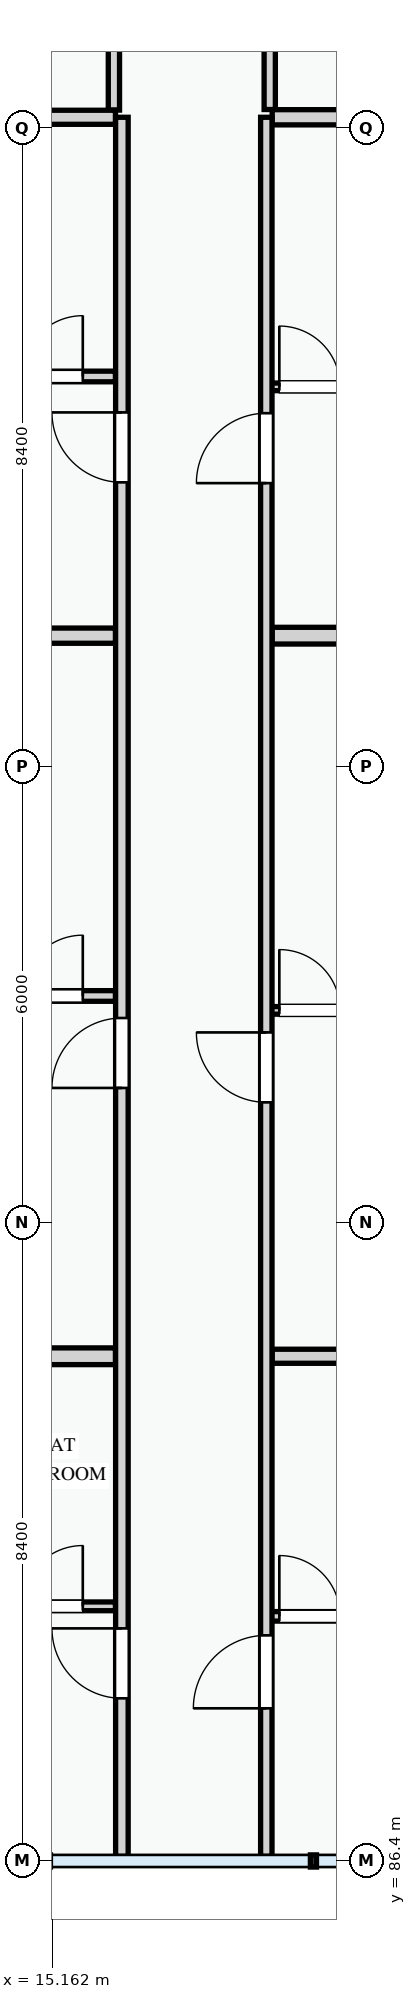
"""IFC4 building model, lengths in metres.
Left out: names, types, materials, properties, quantities, classifications, styles, units other than length and angle.
Written with IfcOpenShell. Run it as: python <this file> out.ifc"""

import sys

from ifc_helpers import new_model, si_unit, direction, frame, frame_2d, origin, place, context, subcontext, project, spatial, rectangle, extrude, element, fill, save


model = new_model("IFC4")
c1 = context("Model", 3, precision=1e-05, world=origin(), true_north=direction((0.0, 1.0)))
c2 = subcontext(c1, "Body", "Model", "MODEL_VIEW")
j1 = project(units=[si_unit("LENGTHUNIT", "METRE"), si_unit("PLANEANGLEUNIT", "RADIAN")], contexts=[c1])
p1 = place(None, origin())
s1 = spatial("IfcSite", under=j1, at=p1, CompositionType="ELEMENT")
p2 = place(p1, origin())
s2 = spatial("IfcBuilding", under=s1, at=p2, CompositionType="ELEMENT")
p3 = place(p2, frame((0.0, 0.0, 31.2)))
s3 = spatial("IfcBuildingStorey", under=s2, at=p3, CompositionType="ELEMENT", Elevation=31.2)
p4 = place(p3, frame((15.975, 113.324, 0.0), z_axis=(0.0, 0.0, 1.0), x_axis=(0.0, -1.0, 0.0)))
e1 = element("IfcWall", 1, at=p4, inside=s3, PredefinedType="PARTITIONING", context=c2, shape_type="SweptSolid", body=[
    extrude(rectangle(XDim=3.889, YDim=0.148, at=frame_2d((1.945, 0.0))), origin(), (0.0, 0.0, 1.0), 3.0),
])
p5 = place(p3, frame((18.025, 113.324, 0.0), z_axis=(0.0, 0.0, 1.0), x_axis=(0.0, -1.0, 0.0)))
e2 = element("IfcWall", 2, at=p5, inside=s3, PredefinedType="PARTITIONING", context=c2, shape_type="SweptSolid", body=[
    extrude(rectangle(XDim=3.882, YDim=0.148, at=frame_2d((1.941, 0.0))), origin(), (0.0, 0.0, 1.0), 3.0),
])
p6 = place(p3, frame((8.54, 89.75, 0.0), z_axis=(0.0, 0.0, 1.0), x_axis=(1.0, 0.0, 0.0)))
e3 = element("IfcWall", 3, at=p6, inside=s3, PredefinedType="PARTITIONING", context=c2, shape_type="SweptSolid", body=[
    extrude(rectangle(XDim=7.456, YDim=0.115, at=frame_2d((3.728, 0.0))), origin(), (0.0, 0.0, 1.0), 3.0),
])
p7 = place(p6, frame((1.324, 0.0, 0.0)))
e4 = element("IfcOpeningElement", 4, at=p7, cuts=e3, PredefinedType="OPENING", context=c2, shape_type="SweptSolid", body=[
    extrude(rectangle(XDim=0.85, YDim=2.1, at=frame_2d((0.425, 1.05))), frame((0.0, 0.067, 0.0), z_axis=(0.0, -1.0, 0.0), x_axis=(1.0, 0.0, 0.0)), (0.0, 0.0, 1.0), 0.135),
])
p8 = place(p6, frame((4.22, 0.0, 0.0)))
e5 = element("IfcOpeningElement", 5, at=p8, cuts=e3, PredefinedType="OPENING", context=c2, shape_type="SweptSolid", body=[
    extrude(rectangle(XDim=0.85, YDim=2.1, at=frame_2d((0.425, 1.05))), frame((0.0, 0.067, 0.0), z_axis=(0.0, -1.0, 0.0), x_axis=(1.0, 0.0, 0.0)), (0.0, 0.0, 1.0), 0.135),
])
p9 = place(p6, frame((6.226, 0.0, 0.0)))
e6 = element("IfcOpeningElement", 6, at=p9, cuts=e3, PredefinedType="OPENING", context=c2, shape_type="SweptSolid", body=[
    extrude(rectangle(XDim=0.8, YDim=2.1, at=frame_2d((0.4, 1.05))), frame((0.0, 0.067, 0.0), z_axis=(0.0, -1.0, 0.0), x_axis=(1.0, 0.0, 0.0)), (0.0, 0.0, 1.0), 0.135),
])
p10 = place(p3, frame((17.98, 89.618, 0.0), z_axis=(0.0, 0.0, 1.0), x_axis=(1.0, 0.0, 0.0)))
e7 = element("IfcWall", 7, at=p10, inside=s3, PredefinedType="PARTITIONING", context=c2, shape_type="SweptSolid", body=[
    extrude(rectangle(XDim=4.68, YDim=0.125, at=frame_2d((2.34, 0.0))), origin(), (0.0, 0.0, 1.0), 3.0),
])
p11 = place(p10, frame((0.171, 0.0, 0.0)))
e8 = element("IfcOpeningElement", 8, at=p11, cuts=e7, PredefinedType="OPENING", context=c2, shape_type="SweptSolid", body=[
    extrude(rectangle(XDim=0.8, YDim=2.1, at=frame_2d((0.4, 1.05))), frame((0.0, 0.073, 0.0), z_axis=(0.0, -1.0, 0.0), x_axis=(1.0, 0.0, 0.0)), (0.0, 0.0, 1.0), 0.145),
])
p12 = place(p10, frame((1.384, 0.0, 0.0)))
e9 = element("IfcOpeningElement", 9, at=p12, cuts=e7, PredefinedType="OPENING", context=c2, shape_type="SweptSolid", body=[
    extrude(rectangle(XDim=0.85, YDim=2.1, at=frame_2d((0.425, 1.05))), frame((0.0, 0.073, 0.0), z_axis=(0.0, -1.0, 0.0), x_axis=(1.0, 0.0, 0.0)), (0.0, 0.0, 1.0), 0.145),
])
p13 = place(p10, frame((3.193, 0.0, 0.0)))
e10 = element("IfcOpeningElement", 10, at=p13, cuts=e7, PredefinedType="OPENING", context=c2, shape_type="SweptSolid", body=[
    extrude(rectangle(XDim=0.85, YDim=2.1, at=frame_2d((0.425, 1.05))), frame((0.0, 0.073, 0.0), z_axis=(0.0, -1.0, 0.0), x_axis=(1.0, 0.0, 0.0)), (0.0, 0.0, 1.0), 0.145),
])
p14 = place(p3, frame((8.54, 97.78, 0.0), z_axis=(0.0, 0.0, 1.0), x_axis=(1.0, 0.0, 0.0)))
e11 = element("IfcWall", 11, at=p14, inside=s3, PredefinedType="PARTITIONING", context=c2, shape_type="SweptSolid", body=[
    extrude(rectangle(XDim=7.456, YDim=0.14, at=frame_2d((3.728, 0.0))), origin(), (0.0, 0.0, 1.0), 3.0),
])
p15 = place(p14, frame((1.324, 0.0, 0.0)))
e12 = element("IfcOpeningElement", 12, at=p15, cuts=e11, PredefinedType="OPENING", context=c2, shape_type="SweptSolid", body=[
    extrude(rectangle(XDim=0.85, YDim=2.1, at=frame_2d((0.425, 1.05))), frame((0.0, 0.08, 0.0), z_axis=(0.0, -1.0, 0.0), x_axis=(1.0, 0.0, 0.0)), (0.0, 0.0, 1.0), 0.16),
])
p16 = place(p14, frame((4.22, 0.0, 0.0)))
e13 = element("IfcOpeningElement", 13, at=p16, cuts=e11, PredefinedType="OPENING", context=c2, shape_type="SweptSolid", body=[
    extrude(rectangle(XDim=0.82, YDim=2.08, at=frame_2d((0.41, 1.04))), frame((0.0, 0.08, 0.0), z_axis=(0.0, -1.0, 0.0), x_axis=(1.0, 0.0, 0.0)), (0.0, 0.0, 1.0), 0.16),
])
p17 = place(p14, frame((6.226, 0.0, 0.0)))
e14 = element("IfcOpeningElement", 14, at=p17, cuts=e11, PredefinedType="OPENING", context=c2, shape_type="SweptSolid", body=[
    extrude(rectangle(XDim=0.8, YDim=2.1, at=frame_2d((0.4, 1.05))), frame((0.0, 0.08, 0.0), z_axis=(0.0, -1.0, 0.0), x_axis=(1.0, 0.0, 0.0)), (0.0, 0.0, 1.0), 0.16),
])
p18 = place(p3, frame((17.98, 97.59, 0.0), z_axis=(0.0, 0.0, 1.0), x_axis=(1.0, 0.0, 0.0)))
e15 = element("IfcWall", 15, at=p18, inside=s3, PredefinedType="PARTITIONING", context=c2, shape_type="SweptSolid", body=[
    extrude(rectangle(XDim=4.76, YDim=0.1, at=frame_2d((2.38, 0.0))), origin(), (0.0, 0.0, 1.0), 3.0),
])
p19 = place(p18, frame((0.171, 0.0, 0.0)))
e16 = element("IfcOpeningElement", 16, at=p19, cuts=e15, PredefinedType="OPENING", context=c2, shape_type="SweptSolid", body=[
    extrude(rectangle(XDim=0.8, YDim=2.1, at=frame_2d((0.4, 1.05))), frame((0.0, 0.06, 0.0), z_axis=(0.0, -1.0, 0.0), x_axis=(1.0, 0.0, 0.0)), (0.0, 0.0, 1.0), 0.12),
])
p20 = place(p18, frame((1.384, 0.0, 0.0)))
e17 = element("IfcOpeningElement", 17, at=p20, cuts=e15, PredefinedType="OPENING", context=c2, shape_type="SweptSolid", body=[
    extrude(rectangle(XDim=0.85, YDim=2.1, at=frame_2d((0.425, 1.05))), frame((0.0, 0.06, 0.0), z_axis=(0.0, -1.0, 0.0), x_axis=(1.0, 0.0, 0.0)), (0.0, 0.0, 1.0), 0.12),
])
p21 = place(p18, frame((3.193, 0.0, 0.0)))
e18 = element("IfcOpeningElement", 18, at=p21, cuts=e15, PredefinedType="OPENING", context=c2, shape_type="SweptSolid", body=[
    extrude(rectangle(XDim=0.82, YDim=2.08, at=frame_2d((0.41, 1.04))), frame((0.0, 0.06, 0.0), z_axis=(0.0, -1.0, 0.0), x_axis=(1.0, 0.0, 0.0)), (0.0, 0.0, 1.0), 0.12),
])
p22 = place(p3, frame((8.54, 93.04, 0.0), z_axis=(0.0, 0.0, 1.0), x_axis=(1.0, 0.0, 0.0)))
e19 = element("IfcWall", 19, at=p22, inside=s3, PredefinedType="PARTITIONING", context=c2, shape_type="SweptSolid", body=[
    extrude(rectangle(XDim=7.456, YDim=0.22, at=frame_2d((3.728, 0.0))), origin(), (0.0, 0.0, 1.0), 3.0),
])
p23 = place(p3, frame((18.057, 93.04, 0.0), z_axis=(0.0, 0.0, 1.0), x_axis=(1.0, 0.0, 0.0)))
e20 = element("IfcWall", 20, at=p23, inside=s3, PredefinedType="PARTITIONING", context=c2, shape_type="SweptSolid", body=[
    extrude(rectangle(XDim=4.604, YDim=0.185, at=frame_2d((2.302, 0.0))), origin(), (0.0, 0.0, 1.0), 3.0),
])
p24 = place(p3, frame((8.54, 105.93, 0.0), z_axis=(0.0, 0.0, 1.0), x_axis=(1.0, 0.0, 0.0)))
e21 = element("IfcWall", 21, at=p24, inside=s3, PredefinedType="PARTITIONING", context=c2, shape_type="SweptSolid", body=[
    extrude(rectangle(XDim=7.456, YDim=0.14, at=frame_2d((3.728, 0.0))), origin(), (0.0, 0.0, 1.0), 3.0),
])
p25 = place(p24, frame((1.324, 0.0, 0.0)))
e22 = element("IfcOpeningElement", 22, at=p25, cuts=e21, PredefinedType="OPENING", context=c2, shape_type="SweptSolid", body=[
    extrude(rectangle(XDim=0.85, YDim=2.1, at=frame_2d((0.425, 1.05))), frame((0.0, 0.08, 0.0), z_axis=(0.0, -1.0, 0.0), x_axis=(1.0, 0.0, 0.0)), (0.0, 0.0, 1.0), 0.16),
])
p26 = place(p24, frame((4.22, 0.0, 0.0)))
e23 = element("IfcOpeningElement", 23, at=p26, cuts=e21, PredefinedType="OPENING", context=c2, shape_type="SweptSolid", body=[
    extrude(rectangle(XDim=0.85, YDim=2.1, at=frame_2d((0.425, 1.05))), frame((0.0, 0.08, 0.0), z_axis=(0.0, -1.0, 0.0), x_axis=(1.0, 0.0, 0.0)), (0.0, 0.0, 1.0), 0.16),
])
p27 = place(p24, frame((6.226, 0.0, 0.0)))
e24 = element("IfcOpeningElement", 24, at=p27, cuts=e21, PredefinedType="OPENING", context=c2, shape_type="SweptSolid", body=[
    extrude(rectangle(XDim=0.8, YDim=2.1, at=frame_2d((0.4, 1.05))), frame((0.0, 0.08, 0.0), z_axis=(0.0, -1.0, 0.0), x_axis=(1.0, 0.0, 0.0)), (0.0, 0.0, 1.0), 0.16),
])
p28 = place(p3, frame((17.98, 105.794, 0.0), z_axis=(0.0, 0.0, 1.0), x_axis=(1.0, 0.0, 0.0)))
e25 = element("IfcWall", 25, at=p28, inside=s3, PredefinedType="PARTITIONING", context=c2, shape_type="SweptSolid", body=[
    extrude(rectangle(XDim=4.68, YDim=0.1, at=frame_2d((2.34, 0.0))), origin(), (0.0, 0.0, 1.0), 3.0),
])
p29 = place(p28, frame((0.171, 0.0, 0.0)))
e26 = element("IfcOpeningElement", 26, at=p29, cuts=e25, PredefinedType="OPENING", context=c2, shape_type="SweptSolid", body=[
    extrude(rectangle(XDim=0.8, YDim=2.1, at=frame_2d((0.4, 1.05))), frame((0.0, 0.06, 0.0), z_axis=(0.0, -1.0, 0.0), x_axis=(1.0, 0.0, 0.0)), (0.0, 0.0, 1.0), 0.12),
])
p30 = place(p28, frame((1.384, 0.0, 0.0)))
e27 = element("IfcOpeningElement", 27, at=p30, cuts=e25, PredefinedType="OPENING", context=c2, shape_type="SweptSolid", body=[
    extrude(rectangle(XDim=0.85, YDim=2.1, at=frame_2d((0.425, 1.05))), frame((0.0, 0.06, 0.0), z_axis=(0.0, -1.0, 0.0), x_axis=(1.0, 0.0, 0.0)), (0.0, 0.0, 1.0), 0.12),
])
p31 = place(p28, frame((3.193, 0.0, 0.0)))
e28 = element("IfcOpeningElement", 28, at=p31, cuts=e25, PredefinedType="OPENING", context=c2, shape_type="SweptSolid", body=[
    extrude(rectangle(XDim=0.85, YDim=2.1, at=frame_2d((0.425, 1.05))), frame((0.0, 0.06, 0.0), z_axis=(0.0, -1.0, 0.0), x_axis=(1.0, 0.0, 0.0)), (0.0, 0.0, 1.0), 0.12),
])
p32 = place(p3, frame((8.54, 102.52, 0.0), z_axis=(0.0, 0.0, 1.0), x_axis=(1.0, 0.0, 0.0)))
e29 = element("IfcWall", 29, at=p32, inside=s3, PredefinedType="PARTITIONING", context=c2, shape_type="SweptSolid", body=[
    extrude(rectangle(XDim=7.456, YDim=0.2, at=frame_2d((3.728, 0.0))), origin(), (0.0, 0.0, 1.0), 3.0),
])
p33 = place(p3, frame((18.057, 102.52, 0.0), z_axis=(0.0, 0.0, 1.0), x_axis=(1.0, 0.0, 0.0)))
e30 = element("IfcWall", 30, at=p33, inside=s3, PredefinedType="PARTITIONING", context=c2, shape_type="SweptSolid", body=[
    extrude(rectangle(XDim=4.604, YDim=0.22, at=frame_2d((2.302, 0.0))), origin(), (0.0, 0.0, 1.0), 3.0),
])
p34 = place(p3, frame((8.54, 109.34, 0.0), z_axis=(0.0, 0.0, 1.0), x_axis=(1.0, 0.0, 0.0)))
e31 = element("IfcWall", 31, at=p34, inside=s3, PredefinedType="PARTITIONING", context=c2, shape_type="SweptSolid", body=[
    extrude(rectangle(XDim=7.456, YDim=0.185, at=frame_2d((3.728, 0.0))), origin(), (0.0, 0.0, 1.0), 2.375),
])
p35 = place(p3, frame((18.057, 109.34, 0.0), z_axis=(0.0, 0.0, 1.0), x_axis=(1.0, 0.0, 0.0)))
e32 = element("IfcWall", 32, at=p35, inside=s3, PredefinedType="PARTITIONING", context=c2, shape_type="SweptSolid", body=[
    extrude(rectangle(XDim=4.683, YDim=0.2, at=frame_2d((2.342, 0.0))), origin(), (0.0, 0.0, 1.0), 2.375),
])
p36 = place(p3, frame((16.08, 86.46, 0.0), z_axis=(0.0, 0.0, 1.0), x_axis=(0.0, 1.0, 0.0)))
e33 = element("IfcWall", 33, at=p36, inside=s3, PredefinedType="PARTITIONING", context=c2, shape_type="SweptSolid", body=[
    extrude(rectangle(XDim=22.88, YDim=0.165, at=frame_2d((11.44, 0.0))), origin(), (0.0, 0.0, 1.0), 3.0),
])
p37 = place(p36, frame((2.08, 0.0, 0.0)))
e34 = element("IfcOpeningElement", 34, at=p37, cuts=e33, PredefinedType="OPENING", context=c2, shape_type="SweptSolid", body=[
    extrude(rectangle(XDim=0.92, YDim=2.1, at=frame_2d((0.46, 1.05))), frame((0.0, 0.093, 0.0), z_axis=(0.0, -1.0, 0.0), x_axis=(1.0, 0.0, 0.0)), (0.0, 0.0, 1.0), 0.185),
])
p38 = place(p36, frame((10.11, 0.0, 0.0)))
e35 = element("IfcOpeningElement", 35, at=p38, cuts=e33, PredefinedType="OPENING", context=c2, shape_type="SweptSolid", body=[
    extrude(rectangle(XDim=0.92, YDim=2.1, at=frame_2d((0.46, 1.05))), frame((0.0, 0.093, 0.0), z_axis=(0.0, -1.0, 0.0), x_axis=(1.0, 0.0, 0.0)), (0.0, 0.0, 1.0), 0.185),
])
p39 = place(p36, frame((18.077, 0.0, 0.0)))
e36 = element("IfcOpeningElement", 36, at=p39, cuts=e33, PredefinedType="OPENING", context=c2, shape_type="SweptSolid", body=[
    extrude(rectangle(XDim=0.92, YDim=2.1, at=frame_2d((0.46, 1.05))), frame((0.0, 0.093, 0.0), z_axis=(0.0, -1.0, 0.0), x_axis=(1.0, 0.0, 0.0)), (0.0, 0.0, 1.0), 0.185),
])
p40 = place(p3, frame((17.98, 86.46, 0.0), z_axis=(0.0, 0.0, 1.0), x_axis=(0.0, 1.0, 0.0)))
e37 = element("IfcWall", 37, at=p40, inside=s3, PredefinedType="PARTITIONING", context=c2, shape_type="SweptSolid", body=[
    extrude(rectangle(XDim=22.88, YDim=0.15, at=frame_2d((11.44, 0.0))), origin(), (0.0, 0.0, 1.0), 3.0),
])
p41 = place(p40, frame((1.948, 0.0, 0.0)))
e38 = element("IfcOpeningElement", 38, at=p41, cuts=e37, PredefinedType="OPENING", context=c2, shape_type="SweptSolid", body=[
    extrude(rectangle(XDim=0.96, YDim=2.12, at=frame_2d((0.48, 1.06))), frame((0.0, 0.085, 0.0), z_axis=(0.0, -1.0, 0.0), x_axis=(1.0, 0.0, 0.0)), (0.0, 0.0, 1.0), 0.17),
])
p42 = place(p40, frame((9.92, 0.0, 0.0)))
e39 = element("IfcOpeningElement", 39, at=p42, cuts=e37, PredefinedType="OPENING", context=c2, shape_type="SweptSolid", body=[
    extrude(rectangle(XDim=0.92, YDim=2.1, at=frame_2d((0.46, 1.05))), frame((0.0, 0.085, 0.0), z_axis=(0.0, -1.0, 0.0), x_axis=(1.0, 0.0, 0.0)), (0.0, 0.0, 1.0), 0.17),
])
p43 = place(p40, frame((18.067, 0.0, 0.0)))
e40 = element("IfcOpeningElement", 40, at=p43, cuts=e37, PredefinedType="OPENING", context=c2, shape_type="SweptSolid", body=[
    extrude(rectangle(XDim=0.92, YDim=2.1, at=frame_2d((0.46, 1.05))), frame((0.0, 0.085, 0.0), z_axis=(0.0, -1.0, 0.0), x_axis=(1.0, 0.0, 0.0)), (0.0, 0.0, 1.0), 0.17),
])
p44 = place(p9, origin())
e41 = element("IfcDoor", 41, at=p44, inside=s3, OperationType="SINGLE_SWING_RIGHT", PredefinedType="DOOR", context=c2, shape_type="SweptSolid", body=[
    extrude(rectangle(XDim=0.8, YDim=2.1, at=frame_2d((0.4, 1.05))), frame((0.0, 0.025, 0.0), z_axis=(0.0, -1.0, 0.0), x_axis=(1.0, 0.0, 0.0)), (0.0, 0.0, 1.0), 0.05),
])
fill(e6, e41)
p45 = place(p11, origin())
e42 = element("IfcDoor", 42, at=p45, inside=s3, OperationType="SINGLE_SWING_LEFT", PredefinedType="DOOR", context=c2, shape_type="SweptSolid", body=[
    extrude(rectangle(XDim=0.8, YDim=2.1, at=frame_2d((0.4, 1.05))), frame((0.0, 0.025, 0.0), z_axis=(0.0, -1.0, 0.0), x_axis=(1.0, 0.0, 0.0)), (0.0, 0.0, 1.0), 0.05),
])
fill(e8, e42)
p46 = place(p17, origin())
e43 = element("IfcDoor", 43, at=p46, inside=s3, OperationType="SINGLE_SWING_RIGHT", PredefinedType="DOOR", context=c2, shape_type="SweptSolid", body=[
    extrude(rectangle(XDim=0.8, YDim=2.1, at=frame_2d((0.4, 1.05))), frame((0.0, 0.025, 0.0), z_axis=(0.0, -1.0, 0.0), x_axis=(1.0, 0.0, 0.0)), (0.0, 0.0, 1.0), 0.05),
])
fill(e14, e43)
p47 = place(p19, origin())
e44 = element("IfcDoor", 44, at=p47, inside=s3, OperationType="SINGLE_SWING_LEFT", PredefinedType="DOOR", context=c2, shape_type="SweptSolid", body=[
    extrude(rectangle(XDim=0.8, YDim=2.1, at=frame_2d((0.4, 1.05))), frame((0.0, 0.025, 0.0), z_axis=(0.0, -1.0, 0.0), x_axis=(1.0, 0.0, 0.0)), (0.0, 0.0, 1.0), 0.05),
])
fill(e16, e44)
p48 = place(p27, origin())
e45 = element("IfcDoor", 45, at=p48, inside=s3, OperationType="SINGLE_SWING_RIGHT", PredefinedType="DOOR", context=c2, shape_type="SweptSolid", body=[
    extrude(rectangle(XDim=0.8, YDim=2.1, at=frame_2d((0.4, 1.05))), frame((0.0, 0.025, 0.0), z_axis=(0.0, -1.0, 0.0), x_axis=(1.0, 0.0, 0.0)), (0.0, 0.0, 1.0), 0.05),
])
fill(e24, e45)
p49 = place(p29, origin())
e46 = element("IfcDoor", 46, at=p49, inside=s3, OperationType="SINGLE_SWING_LEFT", PredefinedType="DOOR", context=c2, shape_type="SweptSolid", body=[
    extrude(rectangle(XDim=0.8, YDim=2.1, at=frame_2d((0.4, 1.05))), frame((0.0, 0.025, 0.0), z_axis=(0.0, -1.0, 0.0), x_axis=(1.0, 0.0, 0.0)), (0.0, 0.0, 1.0), 0.05),
])
fill(e26, e46)
p50 = place(p37, origin())
e47 = element("IfcDoor", 47, at=p50, inside=s3, OperationType="SINGLE_SWING_RIGHT", PredefinedType="DOOR", context=c2, shape_type="SweptSolid", body=[
    extrude(rectangle(XDim=0.92, YDim=2.1, at=frame_2d((0.46, 1.05))), frame((0.0, 0.025, 0.0), z_axis=(0.0, -1.0, 0.0), x_axis=(1.0, 0.0, 0.0)), (0.0, 0.0, 1.0), 0.05),
])
fill(e34, e47)
p51 = place(p38, origin())
e48 = element("IfcDoor", 48, at=p51, inside=s3, OperationType="SINGLE_SWING_LEFT", PredefinedType="DOOR", context=c2, shape_type="SweptSolid", body=[
    extrude(rectangle(XDim=0.92, YDim=2.1, at=frame_2d((0.46, 1.05))), frame((0.0, 0.025, 0.0), z_axis=(0.0, -1.0, 0.0), x_axis=(1.0, 0.0, 0.0)), (0.0, 0.0, 1.0), 0.05),
])
fill(e35, e48)
p52 = place(p39, origin())
e49 = element("IfcDoor", 49, at=p52, inside=s3, OperationType="SINGLE_SWING_RIGHT", PredefinedType="DOOR", context=c2, shape_type="SweptSolid", body=[
    extrude(rectangle(XDim=0.92, YDim=2.1, at=frame_2d((0.46, 1.05))), frame((0.0, 0.025, 0.0), z_axis=(0.0, -1.0, 0.0), x_axis=(1.0, 0.0, 0.0)), (0.0, 0.0, 1.0), 0.05),
])
fill(e36, e49)
p53 = place(p41, origin())
e50 = element("IfcDoor", 50, at=p53, inside=s3, OperationType="SINGLE_SWING_LEFT", PredefinedType="DOOR", context=c2, shape_type="SweptSolid", body=[
    extrude(rectangle(XDim=0.96, YDim=2.12, at=frame_2d((0.48, 1.06))), frame((0.0, 0.025, 0.0), z_axis=(0.0, -1.0, 0.0), x_axis=(1.0, 0.0, 0.0)), (0.0, 0.0, 1.0), 0.05),
])
fill(e38, e50)
p54 = place(p42, origin())
e51 = element("IfcDoor", 51, at=p54, inside=s3, OperationType="SINGLE_SWING_RIGHT", PredefinedType="DOOR", context=c2, shape_type="SweptSolid", body=[
    extrude(rectangle(XDim=0.92, YDim=2.1, at=frame_2d((0.46, 1.05))), frame((0.0, 0.025, 0.0), z_axis=(0.0, -1.0, 0.0), x_axis=(1.0, 0.0, 0.0)), (0.0, 0.0, 1.0), 0.05),
])
fill(e39, e51)
p55 = place(p43, origin())
e52 = element("IfcDoor", 52, at=p55, inside=s3, OperationType="SINGLE_SWING_LEFT", PredefinedType="DOOR", context=c2, shape_type="SweptSolid", body=[
    extrude(rectangle(XDim=0.92, YDim=2.1, at=frame_2d((0.46, 1.05))), frame((0.0, 0.025, 0.0), z_axis=(0.0, -1.0, 0.0), x_axis=(1.0, 0.0, 0.0)), (0.0, 0.0, 1.0), 0.05),
])
fill(e40, e52)
save(model, sys.argv[1])
